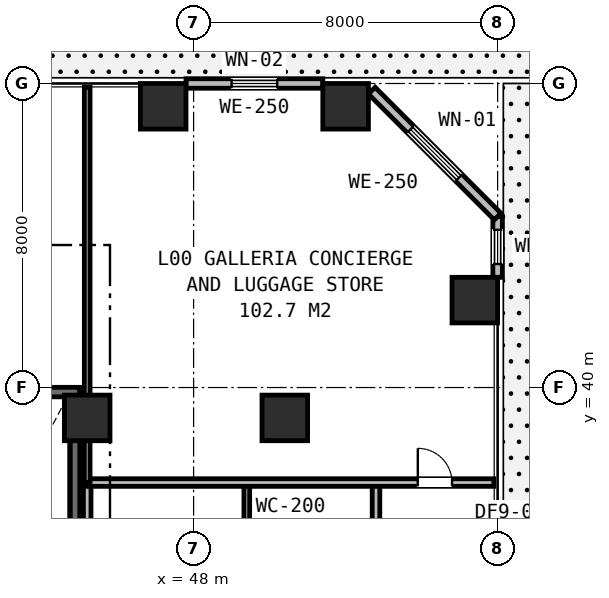
"""IFC4 building model, lengths in metres.
Left out: names, types, materials, properties, quantities, classifications, styles, units other than length and angle.
Written with IfcOpenShell. Run it as: python <this file> out.ifc"""

import sys

from ifc_helpers import new_model, si_unit, direction, frame, frame_2d, origin, origin_2d, place, context, subcontext, project, spatial, rectangle, extrude, element, fill, save


model = new_model("IFC4")
c1 = context("Model", 3, precision=1e-05, world=origin(), true_north=direction((0.0, 1.0)))
c2 = subcontext(c1, "Body", "Model", "MODEL_VIEW")
j1 = project(units=[si_unit("LENGTHUNIT", "METRE"), si_unit("PLANEANGLEUNIT", "RADIAN")], contexts=[c1])
p1 = place(None, origin())
s1 = spatial("IfcSite", under=j1, at=p1, CompositionType="ELEMENT")
p2 = place(p1, origin())
s2 = spatial("IfcBuilding", under=s1, at=p2, CompositionType="ELEMENT")
p3 = place(p2, origin())
s3 = spatial("IfcBuildingStorey", under=s2, at=p3, CompositionType="ELEMENT", Elevation=0.0)
p4 = place(p3, frame((44.88, 31.15, 0.0), z_axis=(0.0, 0.0, 1.0), x_axis=(0.0, 1.0, 0.0)))
e1 = element("IfcWall", 1, at=p4, inside=s3, PredefinedType="SHEAR", context=c2, shape_type="SweptSolid", body=[
    extrude(rectangle(XDim=8.8, YDim=0.25, at=frame_2d((4.4, 0.0))), origin(), (0.0, 0.0, 1.0), 6.0),
])
p5 = place(p3, frame((40.9, 39.88, 0.0), z_axis=(0.0, 0.0, 1.0), x_axis=(1.0, 0.0, 0.0)))
e2 = element("IfcWall", 2, at=p5, inside=s3, PredefinedType="SHEAR", context=c2, shape_type="SweptSolid", body=[
    extrude(rectangle(XDim=4.1, YDim=0.25, at=frame_2d((2.05, 0.0))), origin(), (0.0, 0.0, 1.0), 6.0),
])
for number, where, z_axis, x_axis in (
    (3, (45.2, 39.2, 0.0), (0.0, 0.0, 1.0), (1.0, 0.0, 0.0)),
    (4, (47.2, 47.4, 0.0), (0.0, 0.0, 1.0), (1.0, 0.0, 0.0)),
    (5, (50.4, 39.2, 0.0), (0.0, 0.0, 1.0), (1.0, 0.0, 0.0)),
    (6, (55.4, 42.3, 0.0), (0.0, 0.0, 1.0), (1.0, 0.0, 0.0)),
    (7, (52.0, 47.4, 0.0), (0.0, 0.0, 1.0), (1.0, 0.0, 0.0)),
):
    element("IfcColumn", number, at=place(p3, frame(where, z_axis=z_axis, x_axis=x_axis)), inside=s3, PredefinedType="COLUMN", context=c2, shape_type="SweptSolid", body=[
        extrude(rectangle(XDim=1.2, YDim=1.2, at=origin_2d()), origin(), (0.0, 0.0, 1.0), 6.0),
    ])
p6 = place(p3, frame((56.0, 42.9, 0.0), z_axis=(0.0, 0.0, 1.0), x_axis=(0.0, 1.0, 0.0)))
e8 = element("IfcWall", 8, at=p6, inside=s3, PredefinedType="STANDARD", context=c2, shape_type="SweptSolid", body=[
    extrude(rectangle(XDim=1.6, YDim=0.25, at=frame_2d((0.8, 0.0))), origin(), (0.0, 0.0, 1.0), 5.67),
])
p7 = place(p6, frame((0.35, 0.0, 0.9)))
e9 = element("IfcOpeningElement", 9, at=p7, cuts=e8, PredefinedType="OPENING", context=c2, shape_type="SweptSolid", body=[
    extrude(rectangle(XDim=0.9, YDim=1.55, at=frame_2d((0.45, 0.775))), frame((0.0, 0.135, 0.0), z_axis=(0.0, -1.0, 0.0), x_axis=(1.0, 0.0, 0.0)), (0.0, 0.0, 1.0), 0.27),
])
p8 = place(p3, frame((56.0, 44.5, 0.0), z_axis=(0.0, 0.0, 1.0), x_axis=(-0.707106781187, 0.707106781187, 0.0)))
e10 = element("IfcWall", 10, at=p8, inside=s3, PredefinedType="STANDARD", context=c2, shape_type="SweptSolid", body=[
    extrude(rectangle(XDim=4.683, YDim=0.25, at=frame_2d((2.342, 0.0))), origin(), (0.0, 0.0, 1.0), 5.67),
])
p9 = place(p8, frame((1.442, 0.0, 0.75)))
e11 = element("IfcOpeningElement", 11, at=p9, cuts=e10, PredefinedType="OPENING", context=c2, shape_type="SweptSolid", body=[
    extrude(rectangle(XDim=1.8, YDim=1.85, at=frame_2d((0.9, 0.925))), frame((0.0, 0.135, 0.0), z_axis=(0.0, -1.0, 0.0), x_axis=(1.0, 0.0, 0.0)), (0.0, 0.0, 1.0), 0.27),
])
p10 = place(p3, frame((51.4, 48.0, 0.0), z_axis=(0.0, 0.0, 1.0), x_axis=(-1.0, 0.0, 0.0)))
e12 = element("IfcWall", 12, at=p10, inside=s3, PredefinedType="STANDARD", context=c2, shape_type="SweptSolid", body=[
    extrude(rectangle(XDim=3.6, YDim=0.25, at=frame_2d((1.8, 0.0))), origin(), (0.0, 0.0, 1.0), 5.67),
])
p11 = place(p10, frame((1.2, 0.0, 0.85)))
e13 = element("IfcOpeningElement", 13, at=p11, cuts=e12, PredefinedType="OPENING", context=c2, shape_type="SweptSolid", body=[
    extrude(rectangle(XDim=1.2, YDim=1.6, at=frame_2d((0.6, 0.8))), frame((0.0, 0.135, 0.0), z_axis=(0.0, -1.0, 0.0), x_axis=(1.0, 0.0, 0.0)), (0.0, 0.0, 1.0), 0.27),
])
for number, where, z_axis, x_axis in (
    (14, (52.8, 30.8, 0.0), (0.0, 0.0, 1.0), (0.0, 1.0, 0.0)),
    (15, (45.2, 30.8, 0.0), (0.0, 0.0, 1.0), (0.0, 1.0, 0.0)),
):
    element("IfcWall", number, at=place(p3, frame(where, z_axis=z_axis, x_axis=x_axis)), inside=s3, PredefinedType="PARTITIONING", context=c2, shape_type="SweptSolid", body=[
        extrude(rectangle(XDim=6.7, YDim=0.2, at=frame_2d((3.35, 0.0))), origin(), (0.0, 0.0, 1.0), 5.02),
    ])
p12 = place(p3, frame((49.4, 30.8, 0.0), z_axis=(0.0, 0.0, 1.0), x_axis=(0.0, 1.0, 0.0)))
e16 = element("IfcWall", 16, at=p12, inside=s3, PredefinedType="PARTITIONING", context=c2, shape_type="SweptSolid", body=[
    extrude(rectangle(XDim=6.7, YDim=0.15, at=frame_2d((3.35, 0.0))), origin(), (0.0, 0.0, 1.0), 5.02),
])
p13 = place(p3, frame((45.2, 37.5, 0.0), z_axis=(0.0, 0.0, 1.0), x_axis=(1.0, 0.0, 0.0)))
e17 = element("IfcWall", 17, at=p13, inside=s3, PredefinedType="PARTITIONING", context=c2, shape_type="SweptSolid", body=[
    extrude(rectangle(XDim=10.7, YDim=0.2, at=frame_2d((5.35, 0.0))), origin(), (0.0, 0.0, 1.0), 5.02),
])
p14 = place(p13, frame((8.7, 0.0, 0.0)))
e18 = element("IfcOpeningElement", 18, at=p14, cuts=e17, PredefinedType="OPENING", context=c2, shape_type="SweptSolid", body=[
    extrude(rectangle(XDim=0.9, YDim=2.15, at=frame_2d((0.45, 1.075))), frame((0.0, 0.11, 0.0), z_axis=(0.0, -1.0, 0.0), x_axis=(1.0, 0.0, 0.0)), (0.0, 0.0, 1.0), 0.22),
])
p15 = place(p3, frame((45.2, 37.5, 0.0), z_axis=(0.0, 0.0, 1.0), x_axis=(0.0, 1.0, 0.0)))
e19 = element("IfcWall", 19, at=p15, inside=s3, PredefinedType="PARTITIONING", context=c2, shape_type="SweptSolid", body=[
    extrude(rectangle(XDim=10.4, YDim=0.15, at=frame_2d((5.2, 0.0))), origin(), (0.0, 0.0, 1.0), 5.02),
])
p16 = place(p7, origin())
e20 = element("IfcWindow", 20, at=p16, inside=s3, PartitioningType="SINGLE_PANEL", PredefinedType="WINDOW", context=c2, shape_type="SweptSolid", body=[
    extrude(rectangle(XDim=0.9, YDim=1.55, at=frame_2d((0.45, 0.775))), frame((0.0, 0.03, 0.0), z_axis=(0.0, -1.0, 0.0), x_axis=(1.0, 0.0, 0.0)), (0.0, 0.0, 1.0), 0.06),
])
fill(e9, e20)
p17 = place(p9, origin())
e21 = element("IfcWindow", 21, at=p17, inside=s3, PartitioningType="SINGLE_PANEL", PredefinedType="WINDOW", context=c2, shape_type="SweptSolid", body=[
    extrude(rectangle(XDim=1.8, YDim=1.85, at=frame_2d((0.9, 0.925))), frame((0.0, 0.03, 0.0), z_axis=(0.0, -1.0, 0.0), x_axis=(1.0, 0.0, 0.0)), (0.0, 0.0, 1.0), 0.06),
])
fill(e11, e21)
p18 = place(p11, origin())
e22 = element("IfcWindow", 22, at=p18, inside=s3, PartitioningType="SINGLE_PANEL", PredefinedType="WINDOW", context=c2, shape_type="SweptSolid", body=[
    extrude(rectangle(XDim=1.2, YDim=1.6, at=frame_2d((0.6, 0.8))), frame((0.0, 0.03, 0.0), z_axis=(0.0, -1.0, 0.0), x_axis=(1.0, 0.0, 0.0)), (0.0, 0.0, 1.0), 0.06),
])
fill(e13, e22)
p19 = place(p14, origin())
e23 = element("IfcDoor", 23, at=p19, inside=s3, OperationType="SINGLE_SWING_LEFT", PredefinedType="DOOR", context=c2, shape_type="SweptSolid", body=[
    extrude(rectangle(XDim=0.9, YDim=2.15, at=frame_2d((0.45, 1.075))), frame((0.0, 0.025, 0.0), z_axis=(0.0, -1.0, 0.0), x_axis=(1.0, 0.0, 0.0)), (0.0, 0.0, 1.0), 0.05),
])
fill(e18, e23)
save(model, sys.argv[1])
